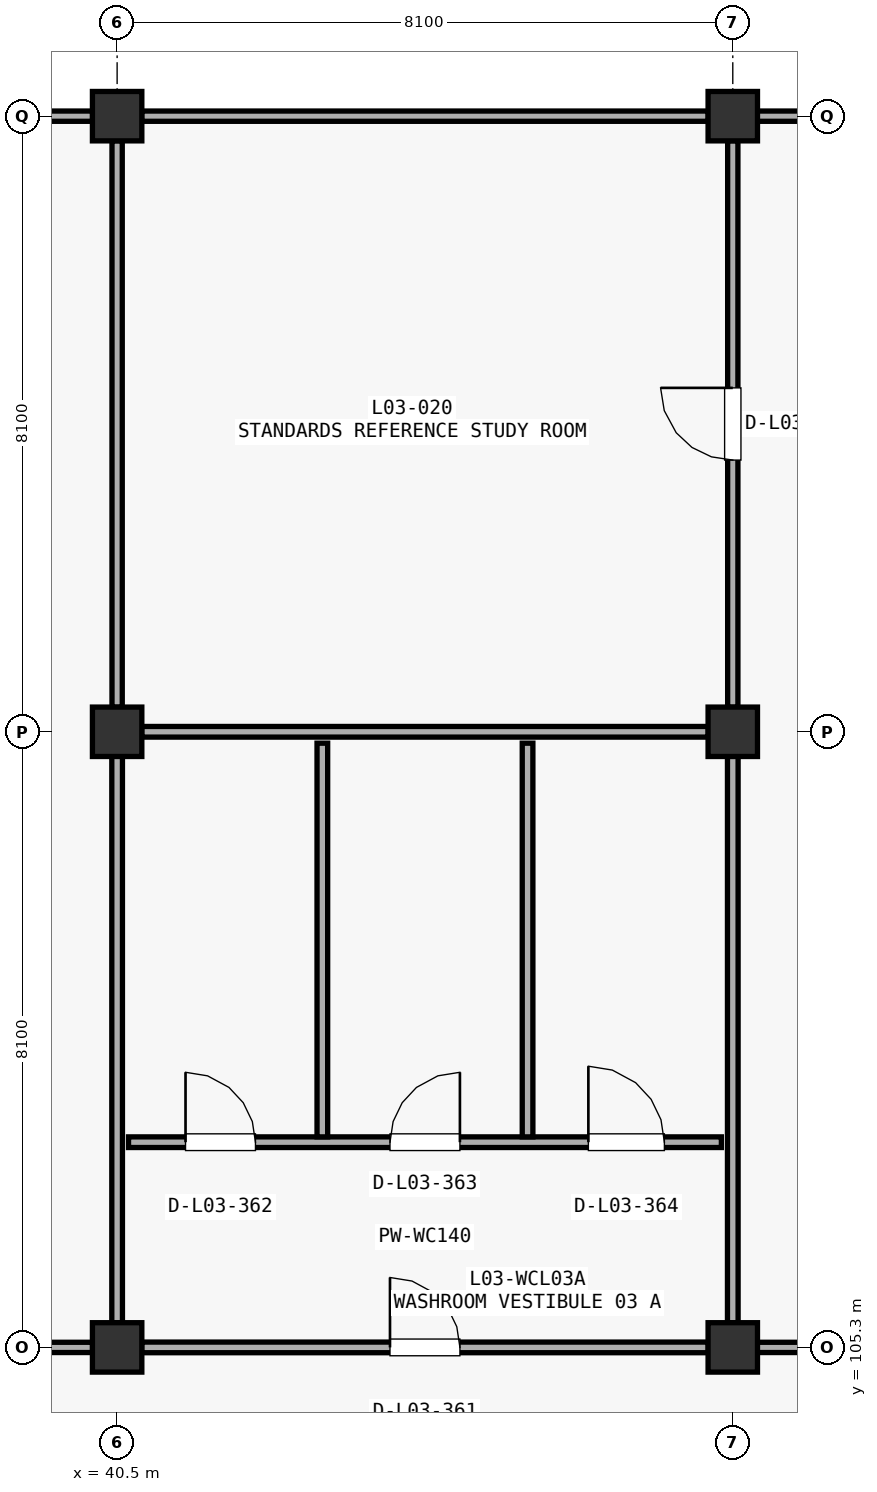
"""IFC4 building model, lengths in metres.
Left out: names, types, materials, properties, quantities, classifications, styles, units other than length and angle.
Written with IfcOpenShell. Run it as: python <this file> out.ifc"""

import sys

from ifc_helpers import new_model, si_unit, direction, frame, frame_2d, origin, origin_2d, place, context, subcontext, project, spatial, rectangle, extrude, element, fill, save


model = new_model("IFC4")
c1 = context("Model", 3, precision=1e-05, world=origin(), true_north=direction((0.0, 1.0)))
c2 = subcontext(c1, "Body", "Model", "MODEL_VIEW")
j1 = project(units=[si_unit("LENGTHUNIT", "METRE"), si_unit("PLANEANGLEUNIT", "RADIAN")], contexts=[c1])
p1 = place(None, origin())
s1 = spatial("IfcSite", under=j1, at=p1, CompositionType="ELEMENT")
p2 = place(p1, origin())
s2 = spatial("IfcBuilding", under=s1, at=p2, CompositionType="ELEMENT")
p3 = place(p2, frame((0.0, 0.0, 14.11)))
s3 = spatial("IfcBuildingStorey", under=s2, at=p3, CompositionType="ELEMENT", Elevation=14.11)
for number, where, z_axis, x_axis in (
    (1, (40.5, 105.3, 0.0), (0.0, 0.0, 1.0), (1.0, 0.0, 0.0)),
    (2, (40.5, 113.4, 0.0), (0.0, 0.0, 1.0), (1.0, 0.0, 0.0)),
    (3, (40.5, 121.5, 0.0), (0.0, 0.0, 1.0), (1.0, 0.0, 0.0)),
    (4, (48.6, 105.3, 0.0), (0.0, 0.0, 1.0), (1.0, 0.0, 0.0)),
    (5, (48.6, 113.4, 0.0), (0.0, 0.0, 1.0), (1.0, 0.0, 0.0)),
    (6, (48.6, 121.5, 0.0), (0.0, 0.0, 1.0), (1.0, 0.0, 0.0)),
):
    element("IfcColumn", number, at=place(p3, frame(where, z_axis=z_axis, x_axis=x_axis)), inside=s3, PredefinedType="COLUMN", context=c2, shape_type="SweptSolid", body=[
        extrude(rectangle(XDim=0.65, YDim=0.65, at=origin_2d()), origin(), (0.0, 0.0, 1.0), 4.42),
    ])
p4 = place(p3, frame((40.823, 105.3, 0.0), z_axis=(0.0, 0.0, 1.0), x_axis=(1.0, 0.0, 0.0)))
e7 = element("IfcWall", 7, at=p4, inside=s3, PredefinedType="PARTITIONING", context=c2, shape_type="SweptSolid", body=[
    extrude(rectangle(XDim=7.454, YDim=0.14, at=frame_2d((3.727, 0.0))), origin(), (0.0, 0.0, 1.0), 3.56),
])
p5 = place(p4, frame((3.267, 0.0, 0.0)))
e8 = element("IfcOpeningElement", 8, at=p5, cuts=e7, PredefinedType="OPENING", context=c2, shape_type="SweptSolid", body=[
    extrude(rectangle(XDim=0.92, YDim=2.15, at=frame_2d((0.46, 1.075))), frame((0.0, 0.08, 0.0), z_axis=(0.0, -1.0, 0.0), x_axis=(1.0, 0.0, 0.0)), (0.0, 0.0, 1.0), 0.16),
])
p6 = place(p3, frame((40.823, 113.4, 0.0), z_axis=(0.0, 0.0, 1.0), x_axis=(1.0, 0.0, 0.0)))
e9 = element("IfcWall", 9, at=p6, inside=s3, PredefinedType="PARTITIONING", context=c2, shape_type="SweptSolid", body=[
    extrude(rectangle(XDim=7.454, YDim=0.14, at=frame_2d((3.727, 0.0))), origin(), (0.0, 0.0, 1.0), 3.31),
])
p7 = place(p3, frame((40.5, 105.623, 0.0), z_axis=(0.0, 0.0, 1.0), x_axis=(0.0, 1.0, 0.0)))
e10 = element("IfcWall", 10, at=p7, inside=s3, PredefinedType="PARTITIONING", context=c2, shape_type="SweptSolid", body=[
    extrude(rectangle(XDim=7.454, YDim=0.14, at=frame_2d((3.727, 0.0))), origin(), (0.0, 0.0, 1.0), 3.56),
])
p8 = place(p3, frame((48.6, 105.623, 0.0), z_axis=(0.0, 0.0, 1.0), x_axis=(0.0, 1.0, 0.0)))
e11 = element("IfcWall", 11, at=p8, inside=s3, PredefinedType="PARTITIONING", context=c2, shape_type="SweptSolid", body=[
    extrude(rectangle(XDim=7.454, YDim=0.14, at=frame_2d((3.727, 0.0))), origin(), (0.0, 0.0, 1.0), 3.21),
])
p9 = place(p3, frame((40.65, 108.0, 0.0), z_axis=(0.0, 0.0, 1.0), x_axis=(1.0, 0.0, 0.0)))
e12 = element("IfcWall", 12, at=p9, inside=s3, PredefinedType="PARTITIONING", context=c2, shape_type="SweptSolid", body=[
    extrude(rectangle(XDim=7.8, YDim=0.14, at=frame_2d((3.9, 0.0))), origin(), (0.0, 0.0, 1.0), 4.162),
])
p10 = place(p9, frame((0.75, 0.0, 0.0)))
e13 = element("IfcOpeningElement", 13, at=p10, cuts=e12, PredefinedType="OPENING", context=c2, shape_type="SweptSolid", body=[
    extrude(rectangle(XDim=0.92, YDim=2.15, at=frame_2d((0.46, 1.075))), frame((0.0, 0.08, 0.0), z_axis=(0.0, -1.0, 0.0), x_axis=(1.0, 0.0, 0.0)), (0.0, 0.0, 1.0), 0.16),
])
p11 = place(p9, frame((3.44, 0.0, 0.0)))
e14 = element("IfcOpeningElement", 14, at=p11, cuts=e12, PredefinedType="OPENING", context=c2, shape_type="SweptSolid", body=[
    extrude(rectangle(XDim=0.92, YDim=2.15, at=frame_2d((0.46, 1.075))), frame((0.0, 0.08, 0.0), z_axis=(0.0, -1.0, 0.0), x_axis=(1.0, 0.0, 0.0)), (0.0, 0.0, 1.0), 0.16),
])
p12 = place(p9, frame((6.05, 0.0, 0.0)))
e15 = element("IfcOpeningElement", 15, at=p12, cuts=e12, PredefinedType="OPENING", context=c2, shape_type="SweptSolid", body=[
    extrude(rectangle(XDim=1.0, YDim=2.15, at=frame_2d((0.5, 1.075))), frame((0.0, 0.08, 0.0), z_axis=(0.0, -1.0, 0.0), x_axis=(1.0, 0.0, 0.0)), (0.0, 0.0, 1.0), 0.16),
])
for number, where, z_axis, x_axis in (
    (16, (43.2, 108.07, 0.0), (0.0, 0.0, 1.0), (0.0, 1.0, 0.0)),
    (17, (45.9, 108.07, 0.0), (0.0, 0.0, 1.0), (0.0, 1.0, 0.0)),
):
    element("IfcWall", number, at=place(p3, frame(where, z_axis=z_axis, x_axis=x_axis)), inside=s3, PredefinedType="PARTITIONING", context=c2, shape_type="SweptSolid", body=[
        extrude(rectangle(XDim=5.18, YDim=0.14, at=frame_2d((2.59, 0.0))), origin(), (0.0, 0.0, 1.0), 4.162),
    ])
p13 = place(p3, frame((32.723, 105.3, 0.0), z_axis=(0.0, 0.0, 1.0), x_axis=(1.0, 0.0, 0.0)))
e18 = element("IfcWall", 18, at=p13, inside=s3, PredefinedType="PARTITIONING", context=c2, shape_type="SweptSolid", body=[
    extrude(rectangle(XDim=7.454, YDim=0.135, at=frame_2d((3.727, 0.0))), origin(), (0.0, 0.0, 1.0), 3.512),
])
for number, where, z_axis, x_axis in (
    (19, (40.5, 113.723, 0.0), (0.0, 0.0, 1.0), (0.0, 1.0, 0.0)),
    (20, (32.723, 121.5, 0.0), (0.0, 0.0, 1.0), (1.0, 0.0, 0.0)),
):
    element("IfcWall", number, at=place(p3, frame(where, z_axis=z_axis, x_axis=x_axis)), inside=s3, PredefinedType="PARTITIONING", context=c2, shape_type="SweptSolid", body=[
        extrude(rectangle(XDim=7.454, YDim=0.135, at=frame_2d((3.727, 0.0))), origin(), (0.0, 0.0, 1.0), 3.312),
    ])
p14 = place(p3, frame((48.923, 105.3, 0.0), z_axis=(0.0, 0.0, 1.0), x_axis=(1.0, 0.0, 0.0)))
e21 = element("IfcWall", 21, at=p14, inside=s3, PredefinedType="PARTITIONING", context=c2, shape_type="SweptSolid", body=[
    extrude(rectangle(XDim=7.454, YDim=0.135, at=frame_2d((3.727, 0.0))), origin(), (0.0, 0.0, 1.0), 3.312),
])
p15 = place(p14, frame((3.252, 0.0, 0.0)))
e22 = element("IfcOpeningElement", 22, at=p15, cuts=e21, PredefinedType="OPENING", context=c2, shape_type="SweptSolid", body=[
    extrude(rectangle(XDim=0.95, YDim=2.15, at=frame_2d((0.475, 1.075))), frame((0.0, 0.078, 0.0), z_axis=(0.0, -1.0, 0.0), x_axis=(1.0, 0.0, 0.0)), (0.0, 0.0, 1.0), 0.155),
])
p16 = place(p3, frame((48.6, 113.723, 0.0), z_axis=(0.0, 0.0, 1.0), x_axis=(0.0, 1.0, 0.0)))
e23 = element("IfcWall", 23, at=p16, inside=s3, PredefinedType="PARTITIONING", context=c2, shape_type="SweptSolid", body=[
    extrude(rectangle(XDim=7.454, YDim=0.135, at=frame_2d((3.727, 0.0))), origin(), (0.0, 0.0, 1.0), 3.412),
])
p17 = place(p16, frame((3.252, 0.0, 0.0)))
e24 = element("IfcOpeningElement", 24, at=p17, cuts=e23, PredefinedType="OPENING", context=c2, shape_type="SweptSolid", body=[
    extrude(rectangle(XDim=0.95, YDim=2.15, at=frame_2d((0.475, 1.075))), frame((0.0, 0.078, 0.0), z_axis=(0.0, -1.0, 0.0), x_axis=(1.0, 0.0, 0.0)), (0.0, 0.0, 1.0), 0.155),
])
p18 = place(p3, frame((48.923, 121.5, 0.0), z_axis=(0.0, 0.0, 1.0), x_axis=(1.0, 0.0, 0.0)))
e25 = element("IfcWall", 25, at=p18, inside=s3, PredefinedType="PARTITIONING", context=c2, shape_type="SweptSolid", body=[
    extrude(rectangle(XDim=7.454, YDim=0.135, at=frame_2d((3.727, 0.0))), origin(), (0.0, 0.0, 1.0), 3.747),
])
p19 = place(p3, frame((40.823, 121.5, 0.0), z_axis=(0.0, 0.0, 1.0), x_axis=(1.0, 0.0, 0.0)))
e26 = element("IfcWall", 26, at=p19, inside=s3, PredefinedType="PARTITIONING", context=c2, shape_type="SweptSolid", body=[
    extrude(rectangle(XDim=7.454, YDim=0.135, at=frame_2d((3.727, 0.0))), origin(), (0.0, 0.0, 1.0), 3.212),
])
p20 = place(p5, origin())
e27 = element("IfcDoor", 27, at=p20, inside=s3, OperationType="SINGLE_SWING_LEFT", PredefinedType="DOOR", context=c2, shape_type="SweptSolid", body=[
    extrude(rectangle(XDim=0.92, YDim=2.15, at=frame_2d((0.46, 1.075))), frame((0.0, 0.025, 0.0), z_axis=(0.0, -1.0, 0.0), x_axis=(1.0, 0.0, 0.0)), (0.0, 0.0, 1.0), 0.05),
])
fill(e8, e27)
p21 = place(p10, origin())
e28 = element("IfcDoor", 28, at=p21, inside=s3, OperationType="SINGLE_SWING_LEFT", PredefinedType="DOOR", context=c2, shape_type="SweptSolid", body=[
    extrude(rectangle(XDim=0.92, YDim=2.15, at=frame_2d((0.46, 1.075))), frame((0.0, 0.025, 0.0), z_axis=(0.0, -1.0, 0.0), x_axis=(1.0, 0.0, 0.0)), (0.0, 0.0, 1.0), 0.05),
])
fill(e13, e28)
p22 = place(p11, origin())
e29 = element("IfcDoor", 29, at=p22, inside=s3, OperationType="SINGLE_SWING_RIGHT", PredefinedType="DOOR", context=c2, shape_type="SweptSolid", body=[
    extrude(rectangle(XDim=0.92, YDim=2.15, at=frame_2d((0.46, 1.075))), frame((0.0, 0.025, 0.0), z_axis=(0.0, -1.0, 0.0), x_axis=(1.0, 0.0, 0.0)), (0.0, 0.0, 1.0), 0.05),
])
fill(e14, e29)
p23 = place(p12, origin())
e30 = element("IfcDoor", 30, at=p23, inside=s3, OperationType="SINGLE_SWING_LEFT", PredefinedType="DOOR", context=c2, shape_type="SweptSolid", body=[
    extrude(rectangle(XDim=1.0, YDim=2.15, at=frame_2d((0.5, 1.075))), frame((0.0, 0.025, 0.0), z_axis=(0.0, -1.0, 0.0), x_axis=(1.0, 0.0, 0.0)), (0.0, 0.0, 1.0), 0.05),
])
fill(e15, e30)
p24 = place(p17, origin())
e31 = element("IfcDoor", 31, at=p24, inside=s3, OperationType="SINGLE_SWING_RIGHT", PredefinedType="DOOR", context=c2, shape_type="SweptSolid", body=[
    extrude(rectangle(XDim=0.95, YDim=2.15, at=frame_2d((0.475, 1.075))), frame((0.0, 0.025, 0.0), z_axis=(0.0, -1.0, 0.0), x_axis=(1.0, 0.0, 0.0)), (0.0, 0.0, 1.0), 0.05),
])
fill(e24, e31)
save(model, sys.argv[1])
